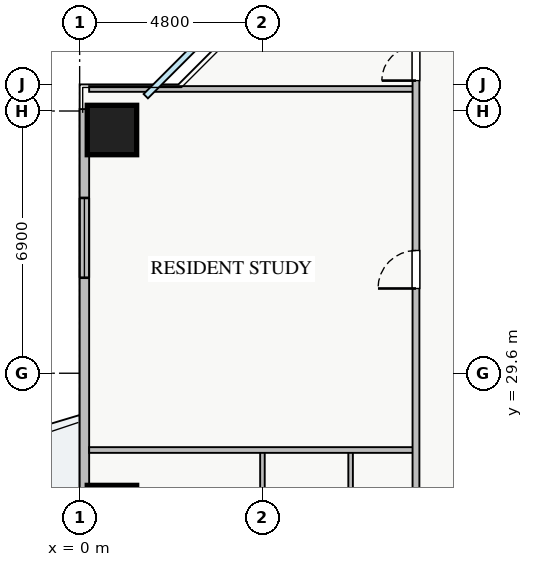
"""IFC4 building model, lengths in metres.
Left out: names, types, materials, properties, quantities, classifications, styles, units other than length and angle.
Written with IfcOpenShell. Run it as: python <this file> out.ifc"""

import sys

from ifc_helpers import new_model, si_unit, direction, frame, frame_2d, origin, origin_2d, place, context, subcontext, project, spatial, rectangle, extrude, source, transform, mapped, element, fill, save


model = new_model("IFC4")
c1 = context("Model", 3, precision=1e-05, world=origin(), true_north=direction((0.0, 1.0)))
c2 = subcontext(c1, "Body", "Model", "MODEL_VIEW")
j1 = project(units=[si_unit("LENGTHUNIT", "METRE"), si_unit("PLANEANGLEUNIT", "RADIAN")], contexts=[c1])
p1 = place(None, origin())
s1 = spatial("IfcSite", under=j1, at=p1, CompositionType="ELEMENT")
p2 = place(p1, origin())
s2 = spatial("IfcBuilding", under=s1, at=p2, CompositionType="ELEMENT")
p3 = place(p2, frame((0.0, 0.0, 32.75)))
s3 = spatial("IfcBuildingStorey", under=s2, at=p3, CompositionType="ELEMENT", Elevation=32.75)
m1 = source(origin(), c2, "Body", "SweptSolid", [
    extrude(rectangle(XDim=1.3, YDim=1.3, at=origin_2d()), origin(), (0.0, 0.0, 1.0), 3.25),
])
for number, where, z_axis, x_axis in (
    (1, (0.85, 36.0, 0.0), (0.0, 0.0, 1.0), (1.0, 0.0, 0.0)),
    (2, (0.85, 26.0, 0.0), (0.0, 0.0, 1.0), (1.0, 0.0, 0.0)),
):
    element("IfcColumn", number, at=place(p3, frame(where, z_axis=z_axis, x_axis=x_axis)), inside=s3, PredefinedType="COLUMN", context=c2, shape_type="MappedRepresentation", body=[
        mapped(m1, transform((0.0, 0.0, 0.0), x_axis=(1.0, 0.0, 0.0), y_axis=(0.0, 1.0, 0.0), z_axis=(0.0, 0.0, 1.0), scale=1.0)),
    ])
p4 = place(p3, frame((0.125, 9.45, 0.0), z_axis=(0.0, 0.0, 1.0), x_axis=(0.0, 1.0, 0.0)))
e3 = element("IfcWall", 3, at=p4, inside=s3, PredefinedType="STANDARD", context=c2, shape_type="SweptSolid", body=[
    extrude(rectangle(XDim=27.1, YDim=0.25, at=frame_2d((13.55, 0.0))), origin(), (0.0, 0.0, 1.0), 2.61),
])
p5 = place(p4, frame((14.4, 0.0, 0.0)))
e4 = element("IfcOpeningElement", 4, at=p5, cuts=e3, PredefinedType="OPENING", context=c2, shape_type="SweptSolid", body=[
    extrude(rectangle(XDim=1.2, YDim=2.1, at=frame_2d((0.6, 1.05))), frame((0.0, 0.135, 0.0), z_axis=(0.0, -1.0, 0.0), x_axis=(1.0, 0.0, 0.0)), (0.0, 0.0, 1.0), 0.27),
])
p6 = place(p4, frame((1.472, 0.0, 0.9)))
e5 = element("IfcOpeningElement", 5, at=p6, cuts=e3, PredefinedType="OPENING", context=c2, shape_type="SweptSolid", body=[
    extrude(rectangle(XDim=2.1, YDim=1.5, at=frame_2d((1.05, 0.75))), frame((0.0, 0.135, 0.0), z_axis=(0.0, -1.0, 0.0), x_axis=(1.0, 0.0, 0.0)), (0.0, 0.0, 1.0), 0.27),
])
p7 = place(p4, frame((22.663, 0.0, 0.9)))
e6 = element("IfcOpeningElement", 6, at=p7, cuts=e3, PredefinedType="OPENING", context=c2, shape_type="SweptSolid", body=[
    extrude(rectangle(XDim=2.1, YDim=1.48, at=frame_2d((1.05, 0.74))), frame((0.0, 0.135, 0.0), z_axis=(0.0, -1.0, 0.0), x_axis=(1.0, 0.0, 0.0)), (0.0, 0.0, 1.0), 0.27),
])
p8 = place(p4, frame((5.278, 0.0, 0.9)))
e7 = element("IfcOpeningElement", 7, at=p8, cuts=e3, PredefinedType="OPENING", context=c2, shape_type="SweptSolid", body=[
    extrude(rectangle(XDim=2.4, YDim=1.5, at=frame_2d((1.2, 0.75))), frame((0.0, 0.135, 0.0), z_axis=(0.0, -1.0, 0.0), x_axis=(1.0, 0.0, 0.0)), (0.0, 0.0, 1.0), 0.27),
])
p9 = place(p4, frame((11.365, 0.0, 0.9)))
e8 = element("IfcOpeningElement", 8, at=p9, cuts=e3, PredefinedType="OPENING", context=c2, shape_type="SweptSolid", body=[
    extrude(rectangle(XDim=0.9, YDim=1.2, at=frame_2d((0.45, 0.6))), frame((0.0, 0.135, 0.0), z_axis=(0.0, -1.0, 0.0), x_axis=(1.0, 0.0, 0.0)), (0.0, 0.0, 1.0), 0.27),
])
p10 = place(p3, frame((0.25, 37.08, 0.0), z_axis=(0.0, 0.0, 1.0), x_axis=(1.0, 0.0, 0.0)))
e9 = element("IfcWall", 9, at=p10, inside=s3, PredefinedType="PARTITIONING", context=c2, shape_type="SweptSolid", body=[
    extrude(rectangle(XDim=8.6, YDim=0.15, at=frame_2d((4.3, 0.0))), origin(), (0.0, 0.0, 1.0), 3.07),
])
for number, where, z_axis, x_axis in (
    (10, (4.81, 22.87, 0.0), (0.0, 0.0, 1.0), (0.0, 1.0, 0.0)),
    (11, (7.13, 22.87, 0.0), (0.0, 0.0, 1.0), (0.0, 1.0, 0.0)),
):
    element("IfcWall", number, at=place(p3, frame(where, z_axis=z_axis, x_axis=x_axis)), inside=s3, PredefinedType="PLUMBINGWALL", context=c2, shape_type="SweptSolid", body=[
        extrude(rectangle(XDim=4.71, YDim=0.12, at=frame_2d((2.355, 0.0))), origin(), (0.0, 0.0, 1.0), 3.07),
    ])
p11 = place(p3, frame((0.25, 27.58, 0.0), z_axis=(0.0, 0.0, 1.0), x_axis=(1.0, 0.0, 0.0)))
e12 = element("IfcWall", 12, at=p11, inside=s3, PredefinedType="PARTITIONING", context=c2, shape_type="SweptSolid", body=[
    extrude(rectangle(XDim=8.6, YDim=0.15, at=frame_2d((4.3, 0.0))), origin(), (0.0, 0.0, 1.0), 3.07),
])
p12 = place(p3, frame((8.85, 7.21, 0.0), z_axis=(0.0, 0.0, 1.0), x_axis=(0.0, 1.0, 0.0)))
e13 = element("IfcWall", 13, at=p12, inside=s3, PredefinedType="PARTITIONING", context=c2, shape_type="SweptSolid", body=[
    extrude(rectangle(XDim=31.23, YDim=0.18, at=frame_2d((15.615, 0.0))), origin(), (0.0, 0.0, 1.0), 3.07),
])
p13 = place(p12, frame((30.09, 0.0, 0.0)))
e14 = element("IfcOpeningElement", 14, at=p13, cuts=e13, PredefinedType="OPENING", context=c2, shape_type="SweptSolid", body=[
    extrude(rectangle(XDim=0.9, YDim=2.05, at=frame_2d((0.45, 1.025))), frame((0.0, 0.1, 0.0), z_axis=(0.0, -1.0, 0.0), x_axis=(1.0, 0.0, 0.0)), (0.0, 0.0, 1.0), 0.2),
])
p14 = place(p12, frame((0.24, 0.0, 0.0)))
e15 = element("IfcOpeningElement", 15, at=p14, cuts=e13, PredefinedType="OPENING", context=c2, shape_type="SweptSolid", body=[
    extrude(rectangle(XDim=0.9, YDim=2.05, at=frame_2d((0.45, 1.025))), frame((0.0, 0.1, 0.0), z_axis=(0.0, -1.0, 0.0), x_axis=(1.0, 0.0, 0.0)), (0.0, 0.0, 1.0), 0.2),
])
p15 = place(p12, frame((3.06, 0.0, 0.0)))
e16 = element("IfcOpeningElement", 16, at=p15, cuts=e13, PredefinedType="OPENING", context=c2, shape_type="SweptSolid", body=[
    extrude(rectangle(XDim=1.0, YDim=2.05, at=frame_2d((0.5, 1.025))), frame((0.0, 0.1, 0.0), z_axis=(0.0, -1.0, 0.0), x_axis=(1.0, 0.0, 0.0)), (0.0, 0.0, 1.0), 0.2),
])
p16 = place(p12, frame((12.795, 0.0, 0.0)))
e17 = element("IfcOpeningElement", 17, at=p16, cuts=e13, PredefinedType="OPENING", context=c2, shape_type="SweptSolid", body=[
    extrude(rectangle(XDim=1.0, YDim=2.05, at=frame_2d((0.5, 1.025))), frame((0.0, 0.1, 0.0), z_axis=(0.0, -1.0, 0.0), x_axis=(1.0, 0.0, 0.0)), (0.0, 0.0, 1.0), 0.2),
])
p17 = place(p12, frame((24.62, 0.0, 0.0)))
e18 = element("IfcOpeningElement", 18, at=p17, cuts=e13, PredefinedType="OPENING", context=c2, shape_type="SweptSolid", body=[
    extrude(rectangle(XDim=1.0, YDim=2.05, at=frame_2d((0.5, 1.025))), frame((0.0, 0.1, 0.0), z_axis=(0.0, -1.0, 0.0), x_axis=(1.0, 0.0, 0.0)), (0.0, 0.0, 1.0), 0.2),
])
m2 = source(origin(), c2, "Body", "SweptSolid", [
    extrude(rectangle(XDim=2.1, YDim=1.48, at=frame_2d((1.05, 0.74))), frame((0.0, 0.03, 0.0), z_axis=(0.0, -1.0, 0.0), x_axis=(1.0, 0.0, 0.0)), (0.0, 0.0, 1.0), 0.06),
])
p18 = place(p7, origin())
e19 = element("IfcWindow", 19, at=p18, inside=s3, PartitioningType="TRIPLE_PANEL_VERTICAL", PredefinedType="WINDOW", context=c2, shape_type="MappedRepresentation", body=[
    mapped(m2, transform((0.0, 0.0, 0.0), x_axis=(1.0, 0.0, 0.0), y_axis=(0.0, 1.0, 0.0), z_axis=(0.0, 0.0, 1.0), scale=1.0)),
])
fill(e6, e19)
m3 = source(origin(), c2, "Body", "SweptSolid", [
    extrude(rectangle(XDim=0.9, YDim=2.05, at=frame_2d((0.45, 1.025))), frame((0.0, 0.025, 0.0), z_axis=(0.0, -1.0, 0.0), x_axis=(1.0, 0.0, 0.0)), (0.0, 0.0, 1.0), 0.05),
])
p19 = place(p13, origin())
e20 = element("IfcDoor", 20, at=p19, inside=s3, OperationType="SINGLE_SWING_LEFT", PredefinedType="DOOR", context=c2, shape_type="MappedRepresentation", body=[
    mapped(m3, transform((0.0, 0.0, 0.0), x_axis=(1.0, 0.0, 0.0), y_axis=(0.0, 1.0, 0.0), z_axis=(0.0, 0.0, 1.0), scale=1.0)),
])
fill(e14, e20)
m4 = source(origin(), c2, "Body", "SweptSolid", [
    extrude(rectangle(XDim=1.0, YDim=2.05, at=frame_2d((0.5, 1.025))), frame((0.0, 0.025, 0.0), z_axis=(0.0, -1.0, 0.0), x_axis=(1.0, 0.0, 0.0)), (0.0, 0.0, 1.0), 0.05),
])
p20 = place(p17, origin())
e21 = element("IfcDoor", 21, at=p20, inside=s3, OperationType="SINGLE_SWING_LEFT", PredefinedType="DOOR", context=c2, shape_type="MappedRepresentation", body=[
    mapped(m4, transform((0.0, 0.0, 0.0), x_axis=(1.0, 0.0, 0.0), y_axis=(0.0, 1.0, 0.0), z_axis=(0.0, 0.0, 1.0), scale=1.0)),
])
fill(e18, e21)
save(model, sys.argv[1])
